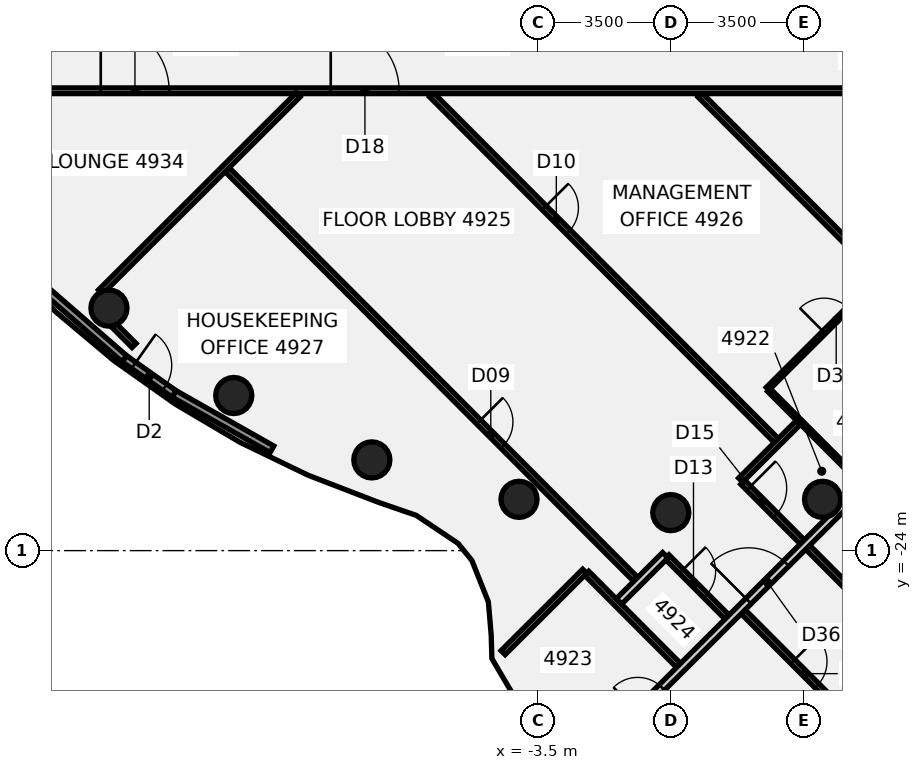
"""IFC4 building model, lengths in metres.
Left out: names, types, materials, properties, quantities, classifications, styles, units other than length and angle.
Written with IfcOpenShell. Run it as: python <this file> out.ifc"""

import sys

from ifc_helpers import new_model, si_unit, direction, frame, frame_2d, origin, origin_2d, place, context, subcontext, project, spatial, rectangle, circle, extrude, element, fill, save


model = new_model("IFC4")
c1 = context("Model", 3, precision=1e-05, world=origin(), true_north=direction((0.0, 1.0)))
c2 = subcontext(c1, "Body", "Model", "MODEL_VIEW")
j1 = project(units=[si_unit("LENGTHUNIT", "METRE"), si_unit("PLANEANGLEUNIT", "RADIAN")], contexts=[c1])
p1 = place(None, origin())
s1 = spatial("IfcSite", under=j1, at=p1, CompositionType="ELEMENT")
p2 = place(p1, origin())
s2 = spatial("IfcBuilding", under=s1, at=p2, CompositionType="ELEMENT")
p3 = place(p2, frame((0.0, 0.0, 196.9)))
s3 = spatial("IfcBuildingStorey", under=s2, at=p3, CompositionType="ELEMENT", Elevation=196.9)
for number, where, z_axis, x_axis in (
    (1, (-14.784, -17.619, -0.14), (0.0, 0.0, 1.0), (1.0, 0.0, 0.0)),
    (2, (-11.5, -19.919, -0.14), (0.0, 0.0, 1.0), (1.0, 0.0, 0.0)),
    (3, (-7.866, -21.613, -0.14), (0.0, 0.0, 1.0), (1.0, 0.0, 0.0)),
    (4, (-3.994, -22.651, -0.14), (0.0, 0.0, 1.0), (1.0, 0.0, 0.0)),
    (5, (0.0, -23.0, -0.14), (0.0, 0.0, 1.0), (1.0, 0.0, 0.0)),
    (6, (3.994, -22.651, -0.14), (0.0, 0.0, 1.0), (1.0, 0.0, 0.0)),
):
    element("IfcColumn", number, at=place(p3, frame(where, z_axis=z_axis, x_axis=x_axis)), inside=s3, PredefinedType="COLUMN", context=c2, shape_type="SweptSolid", body=[
        extrude(circle(Radius=0.475, at=origin_2d()), origin(), (0.0, 0.0, 1.0), 3.6),
    ])
p4 = place(p3, frame((-14.655, -18.069, 0.0), z_axis=(0.0, 0.0, 1.0), x_axis=(0.706295228239, -0.707917403775, 0.0)))
e7 = element("IfcWall", 7, at=p4, inside=s3, PredefinedType="PARTITIONING", context=c2, shape_type="SweptSolid", body=[
    extrude(rectangle(XDim=0.752, YDim=0.15, at=frame_2d((0.376, 0.0))), origin(), (0.0, 0.0, 1.0), 2.864),
])
p5 = place(p3, frame((-11.671, -13.981, 0.0), z_axis=(0.0, 0.0, 1.0), x_axis=(0.706230859369, -0.707981619306, 0.0)))
e8 = element("IfcWall", 8, at=p5, inside=s3, PredefinedType="PARTITIONING", context=c2, shape_type="SweptSolid", body=[
    extrude(rectangle(XDim=15.2, YDim=0.15, at=frame_2d((7.6, 0.0))), origin(), (0.0, 0.0, 1.0), 2.864),
])
p6 = place(p5, frame((9.37, 0.0, 0.0)))
e9 = element("IfcOpeningElement", 9, at=p6, cuts=e8, PredefinedType="OPENING", context=c2, shape_type="SweptSolid", body=[
    extrude(rectangle(XDim=0.9, YDim=2.1, at=frame_2d((0.45, 1.05))), frame((0.0, 0.085, 0.0), z_axis=(0.0, -1.0, 0.0), x_axis=(1.0, 0.0, 0.0)), (0.0, 0.0, 1.0), 0.17),
])
p7 = place(p3, frame((-6.292, -12.01, 0.0), z_axis=(0.0, 0.0, 1.0), x_axis=(0.70618374721, -0.708028611834, 0.0)))
e10 = element("IfcWall", 10, at=p7, inside=s3, PredefinedType="PARTITIONING", context=c2, shape_type="SweptSolid", body=[
    extrude(rectangle(XDim=12.836, YDim=0.15, at=frame_2d((6.418, 0.0))), origin(), (0.0, 0.0, 1.0), 2.864),
])
p8 = place(p7, frame((4.195, 0.0, 0.0)))
e11 = element("IfcOpeningElement", 11, at=p8, cuts=e10, PredefinedType="OPENING", context=c2, shape_type="SweptSolid", body=[
    extrude(rectangle(XDim=0.9, YDim=2.1, at=frame_2d((0.45, 1.05))), frame((0.0, 0.085, 0.0), z_axis=(0.0, -1.0, 0.0), x_axis=(1.0, 0.0, 0.0)), (0.0, 0.0, 1.0), 0.17),
])
p9 = place(p3, frame((-2.213, -24.596, 0.0), z_axis=(0.0, 0.0, 1.0), x_axis=(0.706108044288, -0.70810410943, 0.0)))
e12 = element("IfcWall", 12, at=p9, inside=s3, PredefinedType="PARTITIONING", context=c2, shape_type="SweptSolid", body=[
    extrude(rectangle(XDim=3.425, YDim=0.15, at=frame_2d((1.712, 0.0))), origin(), (0.0, 0.0, 1.0), 2.864),
])
p10 = place(p3, frame((-0.102, -24.164, 0.0), z_axis=(0.0, 0.0, 1.0), x_axis=(0.706288844724, -0.707923772605, 0.0)))
e13 = element("IfcWall", 13, at=p10, inside=s3, PredefinedType="PARTITIONING", context=c2, shape_type="SweptSolid", body=[
    extrude(rectangle(XDim=2.24, YDim=0.15, at=frame_2d((1.12, 0.0))), origin(), (0.0, 0.0, 1.0), 2.864),
])
p11 = place(p10, frame((0.54, 0.0, 0.0)))
e14 = element("IfcOpeningElement", 14, at=p11, cuts=e13, PredefinedType="OPENING", context=c2, shape_type="SweptSolid", body=[
    extrude(rectangle(XDim=0.9, YDim=2.1, at=frame_2d((0.45, 1.05))), frame((0.0, 0.085, 0.0), z_axis=(0.0, -1.0, 0.0), x_axis=(1.0, 0.0, 0.0)), (0.0, 0.0, 1.0), 0.17),
])
p12 = place(p3, frame((0.77, -12.01, 0.0), z_axis=(0.0, 0.0, 1.0), x_axis=(0.706233281546, -0.70797920311, 0.0)))
e15 = element("IfcWall", 15, at=p12, inside=s3, PredefinedType="PARTITIONING", context=c2, shape_type="SweptSolid", body=[
    extrude(rectangle(XDim=15.242, YDim=0.15, at=frame_2d((7.621, 0.0))), origin(), (0.0, 0.0, 1.0), 2.864),
])
p13 = place(p3, frame((1.905, -25.609, 0.0), z_axis=(0.0, 0.0, 1.0), x_axis=(0.706315640058, -0.707897038142, 0.0)))
e16 = element("IfcWall", 16, at=p13, inside=s3, PredefinedType="PARTITIONING", context=c2, shape_type="SweptSolid", body=[
    extrude(rectangle(XDim=3.86, YDim=0.15, at=frame_2d((1.93, 0.0))), origin(), (0.0, 0.0, 1.0), 2.864),
])
p14 = place(p13, frame((1.85, 0.0, 0.0)))
e17 = element("IfcOpeningElement", 17, at=p14, cuts=e16, PredefinedType="OPENING", context=c2, shape_type="SweptSolid", body=[
    extrude(rectangle(XDim=0.9, YDim=2.1, at=frame_2d((0.45, 1.05))), frame((0.0, 0.085, 0.0), z_axis=(0.0, -1.0, 0.0), x_axis=(1.0, 0.0, 0.0)), (0.0, 0.0, 1.0), 0.17),
])
p15 = place(p3, frame((1.895, -22.201, 0.0), z_axis=(0.0, 0.0, 1.0), x_axis=(0.706276457416, -0.707936131088, 0.0)))
e18 = element("IfcWall", 18, at=p15, inside=s3, PredefinedType="PARTITIONING", context=c2, shape_type="SweptSolid", body=[
    extrude(rectangle(XDim=15.74, YDim=0.15, at=frame_2d((7.87, 0.0))), origin(), (0.0, 0.0, 1.0), 2.864),
])
p16 = place(p15, frame((0.22, 0.0, 0.0)))
e19 = element("IfcOpeningElement", 19, at=p16, cuts=e18, PredefinedType="OPENING", context=c2, shape_type="SweptSolid", body=[
    extrude(rectangle(XDim=1.0, YDim=2.1, at=frame_2d((0.5, 1.05))), frame((0.0, 0.085, 0.0), z_axis=(0.0, -1.0, 0.0), x_axis=(1.0, 0.0, 0.0)), (0.0, 0.0, 1.0), 0.17),
])
p17 = place(p15, frame((6.22, 0.0, 0.0)))
e20 = element("IfcOpeningElement", 20, at=p17, cuts=e18, PredefinedType="OPENING", context=c2, shape_type="SweptSolid", body=[
    extrude(rectangle(XDim=0.9, YDim=2.1, at=frame_2d((0.45, 1.05))), frame((0.0, 0.085, 0.0), z_axis=(0.0, -1.0, 0.0), x_axis=(1.0, 0.0, 0.0)), (0.0, 0.0, 1.0), 0.17),
])
p18 = place(p15, frame((14.271, 0.0, 0.0)))
e21 = element("IfcOpeningElement", 21, at=p18, cuts=e18, PredefinedType="OPENING", context=c2, shape_type="SweptSolid", body=[
    extrude(rectangle(XDim=0.9, YDim=2.1, at=frame_2d((0.45, 1.05))), frame((0.0, 0.085, 0.0), z_axis=(0.0, -1.0, 0.0), x_axis=(1.0, 0.0, 0.0)), (0.0, 0.0, 1.0), 0.17),
])
p19 = place(p3, frame((2.583, -19.776, 0.0), z_axis=(0.0, 0.0, 1.0), x_axis=(0.706682050028, -0.707531257379, 0.0)))
e22 = element("IfcWall", 22, at=p19, inside=s3, PredefinedType="PARTITIONING", context=c2, shape_type="SweptSolid", body=[
    extrude(rectangle(XDim=3.45, YDim=0.1, at=frame_2d((1.725, 0.0))), origin(), (0.0, 0.0, 1.0), 2.864),
])
p20 = place(p3, frame((-17.1, -11.9, 0.0), z_axis=(0.0, 0.0, 1.0), x_axis=(1.0, 0.0, 0.0)))
e23 = element("IfcWall", 23, at=p20, inside=s3, PredefinedType="PARTITIONING", context=c2, shape_type="SweptSolid", body=[
    extrude(rectangle(XDim=34.165, YDim=0.15, at=frame_2d((17.083, 0.0))), origin(), (0.0, 0.0, 1.0), 2.864),
])
p21 = place(p20, frame((8.152, 0.0, 0.0)))
e24 = element("IfcOpeningElement", 24, at=p21, cuts=e23, PredefinedType="OPENING", context=c2, shape_type="SweptSolid", body=[
    extrude(rectangle(XDim=1.8, YDim=2.1, at=frame_2d((0.9, 1.05))), frame((0.0, 0.085, 0.0), z_axis=(0.0, -1.0, 0.0), x_axis=(1.0, 0.0, 0.0)), (0.0, 0.0, 1.0), 0.17),
])
p22 = place(p20, frame((2.1, 0.0, 0.0)))
e25 = element("IfcOpeningElement", 25, at=p22, cuts=e23, PredefinedType="OPENING", context=c2, shape_type="SweptSolid", body=[
    extrude(rectangle(XDim=1.8, YDim=2.1, at=frame_2d((0.9, 1.05))), frame((0.0, 0.085, 0.0), z_axis=(0.0, -1.0, 0.0), x_axis=(1.0, 0.0, 0.0)), (0.0, 0.0, 1.0), 0.17),
])
p23 = place(p20, frame((24.96, 0.0, 0.0)))
e26 = element("IfcOpeningElement", 26, at=p23, cuts=e23, PredefinedType="OPENING", context=c2, shape_type="SweptSolid", body=[
    extrude(rectangle(XDim=1.8, YDim=2.1, at=frame_2d((0.9, 1.05))), frame((0.0, 0.085, 0.0), z_axis=(0.0, -1.0, 0.0), x_axis=(1.0, 0.0, 0.0)), (0.0, 0.0, 1.0), 0.17),
])
p24 = place(p3, frame((-15.006, -17.193, 0.0), z_axis=(0.0, 0.0, 1.0), x_axis=(0.708004144821, 0.706208277292, 0.0)))
e27 = element("IfcWall", 27, at=p24, inside=s3, PredefinedType="PARTITIONING", context=c2, shape_type="SweptSolid", body=[
    extrude(rectangle(XDim=7.341, YDim=0.15, at=frame_2d((3.67, 0.0))), origin(), (0.0, 0.0, 1.0), 2.864),
])
p25 = place(p3, frame((-4.412, -26.684, 0.0), z_axis=(0.0, 0.0, 1.0), x_axis=(0.707911866115, 0.706300778573, 0.0)))
e28 = element("IfcWall", 28, at=p25, inside=s3, PredefinedType="PARTITIONING", context=c2, shape_type="SweptSolid", body=[
    extrude(rectangle(XDim=3.031, YDim=0.15, at=frame_2d((1.515, 0.0))), origin(), (0.0, 0.0, 1.0), 2.864),
])
p26 = place(p3, frame((2.548, -19.74, 0.0), z_axis=(0.0, 0.0, 1.0), x_axis=(0.707934704976, 0.706277886877, 0.0)))
e29 = element("IfcWall", 29, at=p26, inside=s3, PredefinedType="PARTITIONING", context=c2, shape_type="SweptSolid", body=[
    extrude(rectangle(XDim=4.126, YDim=0.1, at=frame_2d((2.063, 0.0))), origin(), (0.0, 0.0, 1.0), 2.864),
])
p27 = place(p26, frame((2.1, 0.0, 0.0)))
e30 = element("IfcOpeningElement", 30, at=p27, cuts=e29, PredefinedType="OPENING", context=c2, shape_type="SweptSolid", body=[
    extrude(rectangle(XDim=0.9, YDim=2.1, at=frame_2d((0.45, 1.05))), frame((0.0, 0.06, 0.0), z_axis=(0.0, -1.0, 0.0), x_axis=(1.0, 0.0, 0.0)), (0.0, 0.0, 1.0), 0.12),
])
p28 = place(p3, frame((-1.989, -29.351, 0.0), z_axis=(0.0, 0.0, 1.0), x_axis=(0.708014019558, 0.706198377305, 0.0)))
e31 = element("IfcWall", 31, at=p28, inside=s3, PredefinedType="PARTITIONING", context=c2, shape_type="SweptSolid", body=[
    extrude(rectangle(XDim=14.119, YDim=0.2, at=frame_2d((7.06, 0.0))), origin(), (0.0, 0.0, 1.0), 2.864),
])
p29 = place(p28, frame((5.699, 0.0, 0.0)))
e32 = element("IfcOpeningElement", 32, at=p29, cuts=e31, PredefinedType="OPENING", context=c2, shape_type="SweptSolid", body=[
    extrude(rectangle(XDim=1.4, YDim=2.1, at=frame_2d((0.7, 1.05))), frame((0.0, 0.11, 0.0), z_axis=(0.0, -1.0, 0.0), x_axis=(1.0, 0.0, 0.0)), (0.0, 0.0, 1.0), 0.22),
])
p30 = place(p28, frame((1.579, 0.0, 0.0)))
e33 = element("IfcOpeningElement", 33, at=p30, cuts=e31, PredefinedType="OPENING", context=c2, shape_type="SweptSolid", body=[
    extrude(rectangle(XDim=0.9, YDim=2.1, at=frame_2d((0.45, 1.05))), frame((0.0, 0.11, 0.0), z_axis=(0.0, -1.0, 0.0), x_axis=(1.0, 0.0, 0.0)), (0.0, 0.0, 1.0), 0.22),
])
p31 = place(p3, frame((-1.362, -25.335, 0.0), z_axis=(0.0, 0.0, 1.0), x_axis=(0.708241326576, 0.705970412503, 0.0)))
e34 = element("IfcWall", 34, at=p31, inside=s3, PredefinedType="PARTITIONING", context=c2, shape_type="SweptSolid", body=[
    extrude(rectangle(XDim=1.72, YDim=0.2, at=frame_2d((0.86, 0.0))), origin(), (0.0, 0.0, 1.0), 2.864),
])
p32 = place(p3, frame((1.839, -22.145, 0.0), z_axis=(0.0, 0.0, 1.0), x_axis=(0.708189507156, 0.706022394797, 0.0)))
e35 = element("IfcWall", 35, at=p32, inside=s3, PredefinedType="PARTITIONING", context=c2, shape_type="SweptSolid", body=[
    extrude(rectangle(XDim=2.14, YDim=0.15, at=frame_2d((1.07, 0.0))), origin(), (0.0, 0.0, 1.0), 2.864),
])
p33 = place(p3, frame((-16.611, -17.011, 0.0), z_axis=(0.0, 0.0, 1.0), x_axis=(0.754795534336, -0.65596013701, 0.0)))
e36 = element("IfcWall", 36, at=p33, inside=s3, PredefinedType="SOLIDWALL", context=c2, shape_type="SweptSolid", body=[
    extrude(rectangle(XDim=2.959, YDim=0.2, at=frame_2d((1.479, 0.0))), origin(), (0.0, 0.0, 1.0), 3.46),
])
p34 = place(p3, frame((-13.071, -19.876, 0.0), z_axis=(0.0, 0.0, 1.0), x_axis=(0.870261525936, -0.492589967899, 0.0)))
e37 = element("IfcWall", 37, at=p34, inside=s3, PredefinedType="SOLIDWALL", context=c2, shape_type="SweptSolid", body=[
    extrude(rectangle(XDim=2.959, YDim=0.2, at=frame_2d((1.48, 0.0))), origin(), (0.0, 0.0, 1.0), 3.46),
])
p35 = place(p3, frame((-14.377, -18.952, 0.0), z_axis=(0.0, 0.0, 1.0), x_axis=(0.816354223939, -0.57755153974, 0.0)))
e38 = element("IfcWall", 38, at=p35, inside=s3, PredefinedType="SOLIDWALL", context=c2, shape_type="SweptSolid", body=[
    extrude(rectangle(XDim=1.6, YDim=0.2, at=frame_2d((0.8, 0.0))), origin(), (0.0, 0.0, 1.0), 3.46),
])
p36 = place(p35, frame((0.3, 0.0, 0.0)))
e39 = element("IfcOpeningElement", 39, at=p36, cuts=e38, PredefinedType="OPENING", context=c2, shape_type="SweptSolid", body=[
    extrude(rectangle(XDim=1.0, YDim=2.4, at=frame_2d((0.5, 1.2))), frame((0.0, 0.11, 0.0), z_axis=(0.0, -1.0, 0.0), x_axis=(1.0, 0.0, 0.0)), (0.0, 0.0, 1.0), 0.22),
])
p37 = place(p6, frame((0.9, 0.0, 0.0), z_axis=(0.0, 0.0, 1.0), x_axis=(-1.0, 0.0, 0.0)))
e40 = element("IfcDoor", 40, at=p37, inside=s3, OperationType="SINGLE_SWING_RIGHT", PredefinedType="DOOR", context=c2, shape_type="SweptSolid", body=[
    extrude(rectangle(XDim=0.9, YDim=2.1, at=frame_2d((0.45, 1.05))), frame((0.0, 0.025, 0.0), z_axis=(0.0, -1.0, 0.0), x_axis=(1.0, 0.0, 0.0)), (0.0, 0.0, 1.0), 0.05),
])
fill(e9, e40)
p38 = place(p8, origin())
e41 = element("IfcDoor", 41, at=p38, inside=s3, OperationType="SINGLE_SWING_RIGHT", PredefinedType="DOOR", context=c2, shape_type="SweptSolid", body=[
    extrude(rectangle(XDim=0.9, YDim=2.1, at=frame_2d((0.45, 1.05))), frame((0.0, 0.025, 0.0), z_axis=(0.0, -1.0, 0.0), x_axis=(1.0, 0.0, 0.0)), (0.0, 0.0, 1.0), 0.05),
])
fill(e11, e41)
p39 = place(p11, frame((0.9, 0.0, 0.0), z_axis=(0.0, 0.0, 1.0), x_axis=(-1.0, 0.0, 0.0)))
e42 = element("IfcDoor", 42, at=p39, inside=s3, OperationType="SINGLE_SWING_LEFT", PredefinedType="DOOR", context=c2, shape_type="SweptSolid", body=[
    extrude(rectangle(XDim=0.9, YDim=2.1, at=frame_2d((0.45, 1.05))), frame((0.0, 0.025, 0.0), z_axis=(0.0, -1.0, 0.0), x_axis=(1.0, 0.0, 0.0)), (0.0, 0.0, 1.0), 0.05),
])
fill(e14, e42)
p40 = place(p14, frame((0.9, 0.0, 0.0), z_axis=(0.0, 0.0, 1.0), x_axis=(-1.0, 0.0, 0.0)))
e43 = element("IfcDoor", 43, at=p40, inside=s3, OperationType="SINGLE_SWING_RIGHT", PredefinedType="DOOR", context=c2, shape_type="SweptSolid", body=[
    extrude(rectangle(XDim=0.9, YDim=2.1, at=frame_2d((0.45, 1.05))), frame((0.0, 0.025, 0.0), z_axis=(0.0, -1.0, 0.0), x_axis=(1.0, 0.0, 0.0)), (0.0, 0.0, 1.0), 0.05),
])
fill(e17, e43)
p41 = place(p16, origin())
e44 = element("IfcDoor", 44, at=p41, inside=s3, OperationType="SINGLE_SWING_RIGHT", PredefinedType="DOOR", context=c2, shape_type="SweptSolid", body=[
    extrude(rectangle(XDim=1.0, YDim=2.1, at=frame_2d((0.5, 1.05))), frame((0.0, 0.025, 0.0), z_axis=(0.0, -1.0, 0.0), x_axis=(1.0, 0.0, 0.0)), (0.0, 0.0, 1.0), 0.05),
])
fill(e19, e44)
p42 = place(p21, origin())
e45 = element("IfcDoor", 45, at=p42, inside=s3, OperationType="DOUBLE_DOOR_SINGLE_SWING", PredefinedType="DOOR", context=c2, shape_type="SweptSolid", body=[
    extrude(rectangle(XDim=1.8, YDim=2.1, at=frame_2d((0.9, 1.05))), frame((0.0, 0.025, 0.0), z_axis=(0.0, -1.0, 0.0), x_axis=(1.0, 0.0, 0.0)), (0.0, 0.0, 1.0), 0.05),
])
fill(e24, e45)
p43 = place(p22, frame((1.8, 0.0, 0.0), z_axis=(0.0, 0.0, 1.0), x_axis=(-1.0, 0.0, 0.0)))
e46 = element("IfcDoor", 46, at=p43, inside=s3, OperationType="DOUBLE_DOOR_SINGLE_SWING", PredefinedType="DOOR", context=c2, shape_type="SweptSolid", body=[
    extrude(rectangle(XDim=1.8, YDim=2.1, at=frame_2d((0.9, 1.05))), frame((0.0, 0.025, 0.0), z_axis=(0.0, -1.0, 0.0), x_axis=(1.0, 0.0, 0.0)), (0.0, 0.0, 1.0), 0.05),
])
fill(e25, e46)
p44 = place(p27, frame((0.9, 0.0, 0.0), z_axis=(0.0, 0.0, 1.0), x_axis=(-1.0, 0.0, 0.0)))
e47 = element("IfcDoor", 47, at=p44, inside=s3, OperationType="SINGLE_SWING_RIGHT", PredefinedType="DOOR", context=c2, shape_type="SweptSolid", body=[
    extrude(rectangle(XDim=0.9, YDim=2.1, at=frame_2d((0.45, 1.05))), frame((0.0, 0.025, 0.0), z_axis=(0.0, -1.0, 0.0), x_axis=(1.0, 0.0, 0.0)), (0.0, 0.0, 1.0), 0.05),
])
fill(e30, e47)
p45 = place(p29, origin())
e48 = element("IfcDoor", 48, at=p45, inside=s3, OperationType="DOUBLE_DOOR_SINGLE_SWING", PredefinedType="DOOR", context=c2, shape_type="SweptSolid", body=[
    extrude(rectangle(XDim=1.4, YDim=2.1, at=frame_2d((0.7, 1.05))), frame((0.0, 0.025, 0.0), z_axis=(0.0, -1.0, 0.0), x_axis=(1.0, 0.0, 0.0)), (0.0, 0.0, 1.0), 0.05),
])
fill(e32, e48)
p46 = place(p30, origin())
e49 = element("IfcDoor", 49, at=p46, inside=s3, OperationType="SINGLE_SWING_RIGHT", PredefinedType="DOOR", context=c2, shape_type="SweptSolid", body=[
    extrude(rectangle(XDim=0.9, YDim=2.1, at=frame_2d((0.45, 1.05))), frame((0.0, 0.025, 0.0), z_axis=(0.0, -1.0, 0.0), x_axis=(1.0, 0.0, 0.0)), (0.0, 0.0, 1.0), 0.05),
])
fill(e33, e49)
p47 = place(p36, origin())
e50 = element("IfcDoor", 50, at=p47, inside=s3, OperationType="SINGLE_SWING_LEFT", PredefinedType="DOOR", context=c2, shape_type="SweptSolid", body=[
    extrude(rectangle(XDim=1.0, YDim=2.4, at=frame_2d((0.5, 1.2))), frame((0.0, 0.025, 0.0), z_axis=(0.0, -1.0, 0.0), x_axis=(1.0, 0.0, 0.0)), (0.0, 0.0, 1.0), 0.05),
])
fill(e39, e50)
save(model, sys.argv[1])
